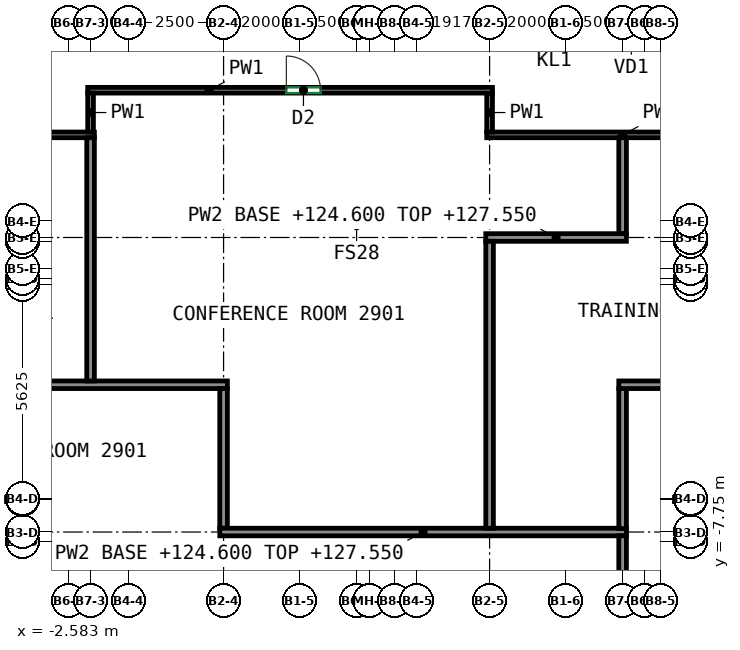
"""IFC4 building model, lengths in metres.
Left out: names, types, materials, properties, quantities, classifications, styles, units other than length and angle.
Written with IfcOpenShell. Run it as: python <this file> out.ifc"""

import sys

from ifc_helpers import new_model, si_unit, direction, frame, frame_2d, origin, place, context, subcontext, project, spatial, rectangle, extrude, element, fill, save


model = new_model("IFC4")
c1 = context("Model", 3, precision=1e-05, world=origin(), true_north=direction((0.0, 1.0)))
c2 = subcontext(c1, "Body", "Model", "MODEL_VIEW")
j1 = project(units=[si_unit("LENGTHUNIT", "METRE"), si_unit("PLANEANGLEUNIT", "RADIAN")], contexts=[c1])
p1 = place(None, origin())
s1 = spatial("IfcSite", under=j1, at=p1, CompositionType="ELEMENT")
p2 = place(p1, origin())
s2 = spatial("IfcBuilding", under=s1, at=p2, CompositionType="ELEMENT")
p3 = place(p2, frame((0.0, 0.0, 124.6)))
s3 = spatial("IfcBuildingStorey", under=s2, at=p3, CompositionType="ELEMENT", Elevation=124.6)
p4 = place(p3, frame((-7.875, 2.95, 0.0), z_axis=(0.0, 0.0, 1.0), x_axis=(1.0, 0.0, 0.0)))
e1 = element("IfcWall", 1, at=p4, inside=s3, PredefinedType="PARTITIONING", context=c2, shape_type="SweptSolid", body=[
    extrude(rectangle(XDim=5.975, YDim=0.15, at=frame_2d((2.988, 0.0))), origin(), (0.0, 0.0, 1.0), 3.6),
])
p5 = place(p3, frame((8.425, 2.95, 0.0), z_axis=(0.0, 0.0, 1.0), x_axis=(1.0, 0.0, 0.0)))
e2 = element("IfcWall", 2, at=p5, inside=s3, PredefinedType="PARTITIONING", context=c2, shape_type="SweptSolid", body=[
    extrude(rectangle(XDim=7.15, YDim=0.15, at=frame_2d((3.575, 0.0))), origin(), (0.0, 0.0, 1.0), 3.6),
])
p6 = place(p3, frame((8.5, 4.05, 0.0), z_axis=(0.0, 0.0, 1.0), x_axis=(0.0, -1.0, 0.0)))
e3 = element("IfcWall", 3, at=p6, inside=s3, PredefinedType="PARTITIONING", context=c2, shape_type="SweptSolid", body=[
    extrude(rectangle(XDim=1.025, YDim=0.15, at=frame_2d((0.513, 0.0))), origin(), (0.0, 0.0, 1.0), 3.6),
])
p7 = place(p3, frame((-2.075, 4.125, 0.0), z_axis=(0.0, 0.0, 1.0), x_axis=(1.0, 0.0, 0.0)))
e4 = element("IfcWall", 4, at=p7, inside=s3, PredefinedType="PARTITIONING", context=c2, shape_type="SweptSolid", body=[
    extrude(rectangle(XDim=10.65, YDim=0.15, at=frame_2d((5.325, 0.0))), origin(), (0.0, 0.0, 1.0), 3.6),
])
p8 = place(p7, frame((5.227, 0.0, 0.0)))
e5 = element("IfcOpeningElement", 5, at=p8, cuts=e4, PredefinedType="OPENING", context=c2, shape_type="SweptSolid", body=[
    extrude(rectangle(XDim=0.9, YDim=2.1, at=frame_2d((0.45, 1.05))), frame((0.0, 0.085, 0.0), z_axis=(0.0, -1.0, 0.0), x_axis=(1.0, 0.0, 0.0)), (0.0, 0.0, 1.0), 0.17),
])
p9 = place(p3, frame((-2.0, 3.025, 0.0), z_axis=(0.0, 0.0, 1.0), x_axis=(0.0, 1.0, 0.0)))
e6 = element("IfcWall", 6, at=p9, inside=s3, PredefinedType="PARTITIONING", context=c2, shape_type="SweptSolid", body=[
    extrude(rectangle(XDim=1.025, YDim=0.15, at=frame_2d((0.513, 0.0))), origin(), (0.0, 0.0, 1.0), 3.6),
])
p10 = place(p3, frame((-7.874, -3.625, 0.0), z_axis=(0.0, 0.0, 1.0), x_axis=(1.0, 0.0, 0.0)))
e7 = element("IfcWall", 7, at=p10, inside=s3, PredefinedType="PARTITIONING", context=c2, shape_type="SweptSolid", body=[
    extrude(rectangle(XDim=9.474, YDim=0.2, at=frame_2d((4.737, 0.0))), origin(), (0.0, 0.0, 1.0), 3.6),
])
p11 = place(p3, frame((-2.0, -3.525, 0.0), z_axis=(0.0, 0.0, 1.0), x_axis=(0.0, 1.0, 0.0)))
e8 = element("IfcWall", 8, at=p11, inside=s3, PredefinedType="PARTITIONING", context=c2, shape_type="SweptSolid", body=[
    extrude(rectangle(XDim=6.399, YDim=0.2, at=frame_2d((3.199, 0.0))), origin(), (0.0, 0.0, 1.0), 3.6),
])
p12 = place(p3, frame((1.5, -7.4, 0.0), z_axis=(0.0, 0.0, 1.0), x_axis=(0.0, 1.0, 0.0)))
e9 = element("IfcWall", 9, at=p12, inside=s3, PredefinedType="PARTITIONING", context=c2, shape_type="SweptSolid", body=[
    extrude(rectangle(XDim=3.675, YDim=0.2, at=frame_2d((1.837, 0.0))), origin(), (0.0, 0.0, 1.0), 3.6),
])
p13 = place(p3, frame((1.4, -7.5, 0.0), z_axis=(0.0, 0.0, 1.0), x_axis=(1.0, 0.0, 0.0)))
e10 = element("IfcWall", 10, at=p13, inside=s3, PredefinedType="PARTITIONING", context=c2, shape_type="SweptSolid", body=[
    extrude(rectangle(XDim=10.7, YDim=0.2, at=frame_2d((5.35, 0.0))), origin(), (0.0, 0.0, 1.0), 2.95),
])
p14 = place(p3, frame((12.0, -11.275, 0.0), z_axis=(0.0, 0.0, 1.0), x_axis=(0.0, 1.0, 0.0)))
e11 = element("IfcWall", 11, at=p14, inside=s3, PredefinedType="PARTITIONING", context=c2, shape_type="SweptSolid", body=[
    extrude(rectangle(XDim=3.675, YDim=0.2, at=frame_2d((1.837, 0.0))), origin(), (0.0, 0.0, 1.0), 3.6),
])
p15 = place(p3, frame((12.0, 0.35, 0.0), z_axis=(0.0, 0.0, 1.0), x_axis=(0.0, 1.0, 0.0)))
e12 = element("IfcWall", 12, at=p15, inside=s3, PredefinedType="PARTITIONING", context=c2, shape_type="SweptSolid", body=[
    extrude(rectangle(XDim=2.524, YDim=0.2, at=frame_2d((1.262, 0.0))), origin(), (0.0, 0.0, 1.0), 3.6),
])
p16 = place(p3, frame((8.4, 0.25, 0.0), z_axis=(0.0, 0.0, 1.0), x_axis=(1.0, 0.0, 0.0)))
e13 = element("IfcWall", 13, at=p16, inside=s3, PredefinedType="PARTITIONING", context=c2, shape_type="SweptSolid", body=[
    extrude(rectangle(XDim=3.7, YDim=0.2, at=frame_2d((1.85, 0.0))), origin(), (0.0, 0.0, 1.0), 2.95),
])
p17 = place(p3, frame((8.5, -7.4, 0.0), z_axis=(0.0, 0.0, 1.0), x_axis=(0.0, 1.0, 0.0)))
e14 = element("IfcWall", 14, at=p17, inside=s3, PredefinedType="PARTITIONING", context=c2, shape_type="SweptSolid", body=[
    extrude(rectangle(XDim=7.55, YDim=0.2, at=frame_2d((3.775, 0.0))), origin(), (0.0, 0.0, 1.0), 3.6),
])
p18 = place(p3, frame((12.0, -7.41, 0.0), z_axis=(0.0, 0.0, 1.0), x_axis=(0.0, 1.0, 0.0)))
e15 = element("IfcWall", 15, at=p18, inside=s3, PredefinedType="PARTITIONING", context=c2, shape_type="SweptSolid", body=[
    extrude(rectangle(XDim=3.685, YDim=0.2, at=frame_2d((1.842, 0.0))), origin(), (0.0, 0.0, 1.0), 3.6),
])
p19 = place(p3, frame((11.9, -3.625, 0.0), z_axis=(0.0, 0.0, 1.0), x_axis=(1.0, 0.0, 0.0)))
e16 = element("IfcWall", 16, at=p19, inside=s3, PredefinedType="PARTITIONING", context=c2, shape_type="SweptSolid", body=[
    extrude(rectangle(XDim=7.124, YDim=0.2, at=frame_2d((3.562, 0.0))), origin(), (0.0, 0.0, 1.0), 3.6),
])
p20 = place(p8, origin())
e17 = element("IfcDoor", 17, at=p20, inside=s3, OperationType="SINGLE_SWING_LEFT", PredefinedType="DOOR", context=c2, shape_type="SweptSolid", body=[
    extrude(rectangle(XDim=0.9, YDim=2.1, at=frame_2d((0.45, 1.05))), frame((0.0, 0.025, 0.0), z_axis=(0.0, -1.0, 0.0), x_axis=(1.0, 0.0, 0.0)), (0.0, 0.0, 1.0), 0.05),
])
fill(e5, e17)
save(model, sys.argv[1])
